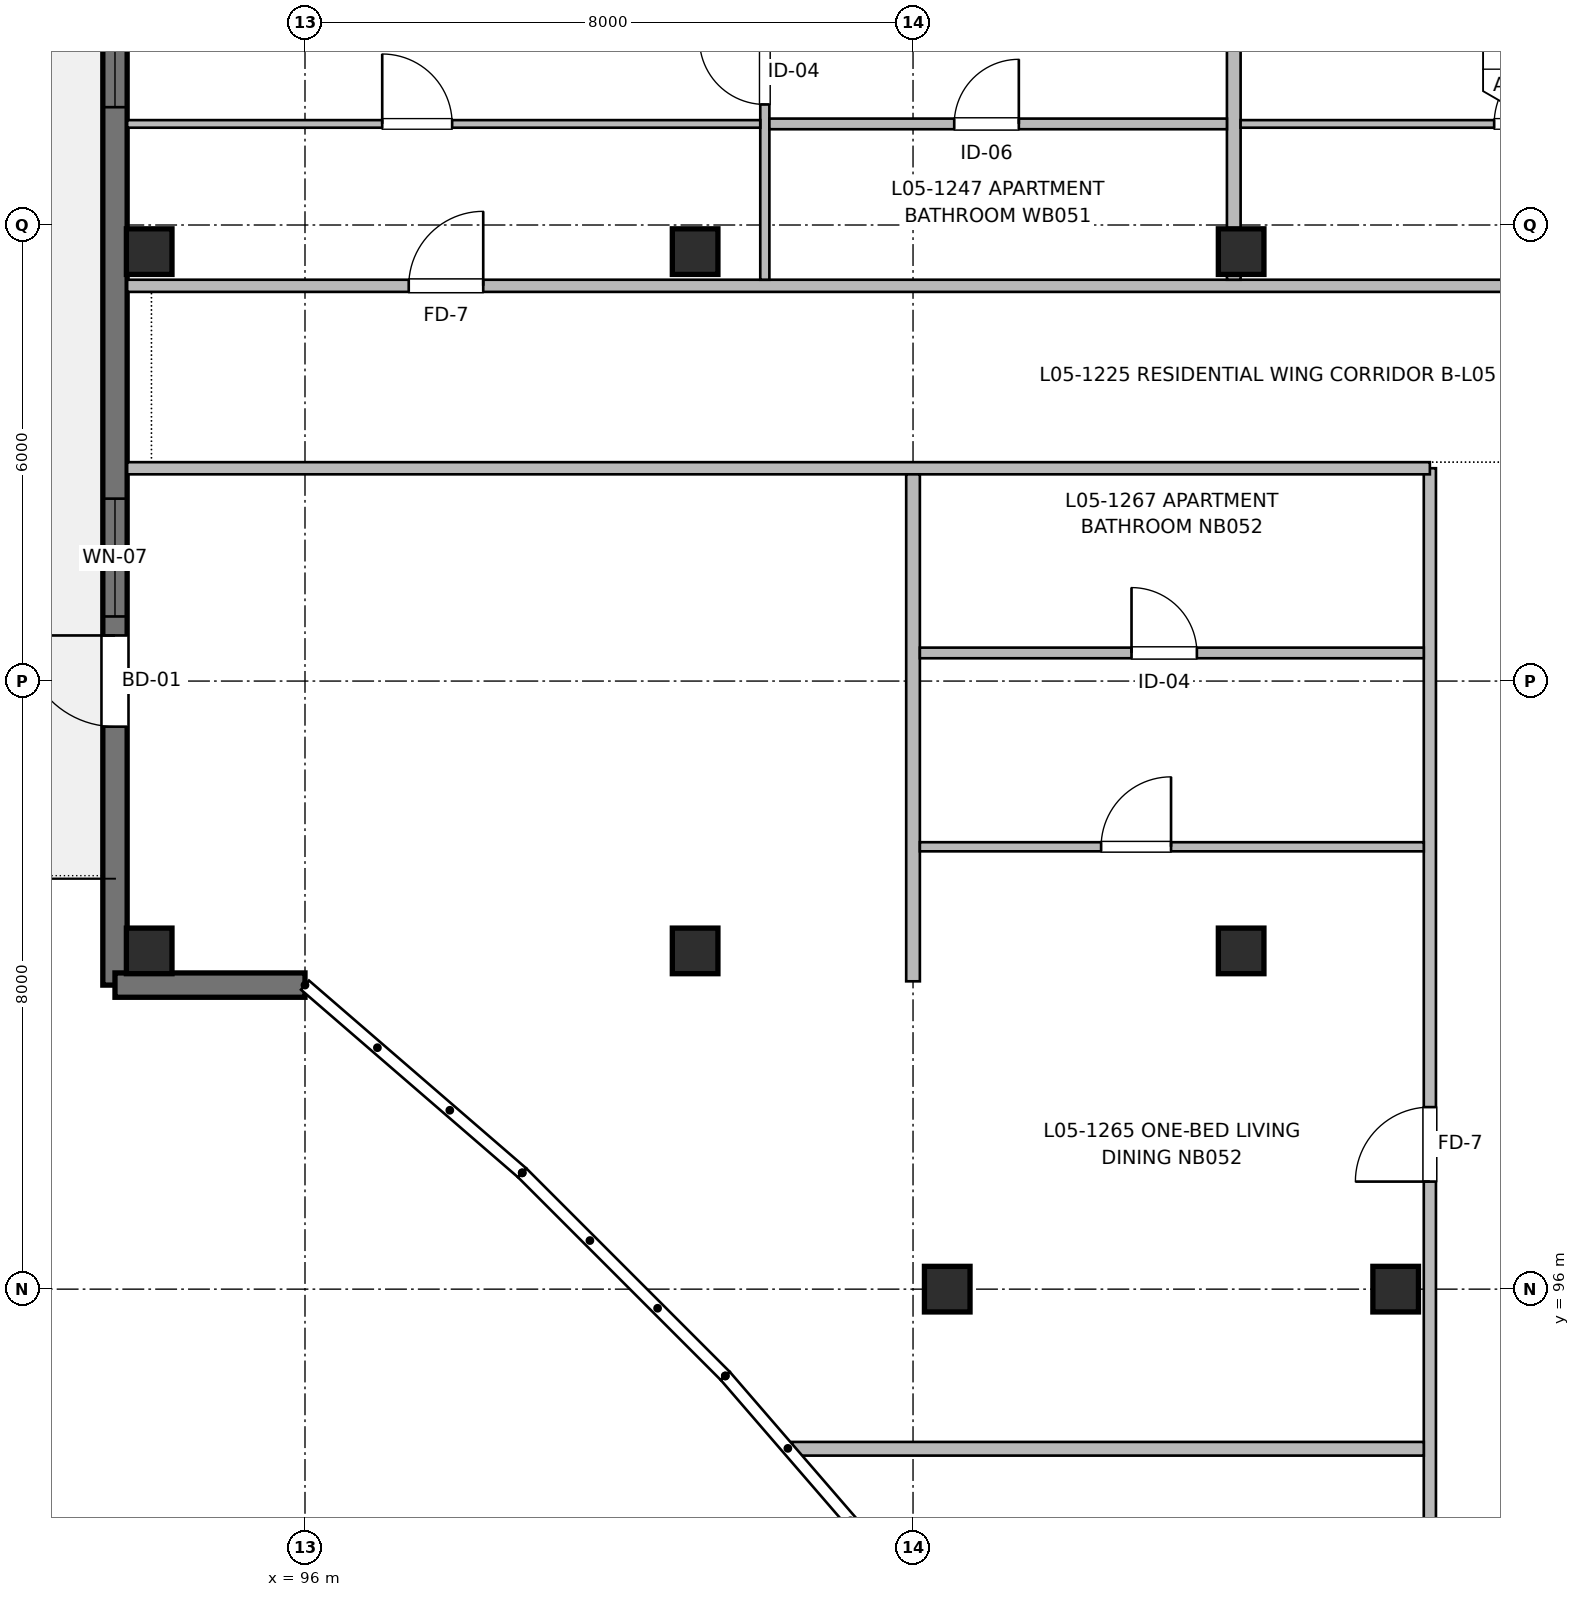
"""IFC4 building model, lengths in metres.
Left out: names, types, materials, properties, quantities, classifications, styles, units other than length and angle.
Written with IfcOpenShell. Run it as: python <this file> out.ifc"""

import sys

from ifc_helpers import new_model, si_unit, direction, frame, frame_2d, origin, origin_2d, place, context, subcontext, project, spatial, rectangle, extrude, element, fill, save


model = new_model("IFC4")
c1 = context("Model", 3, precision=1e-05, world=origin(), true_north=direction((0.0, 1.0)))
c2 = subcontext(c1, "Body", "Model", "MODEL_VIEW")
j1 = project(units=[si_unit("LENGTHUNIT", "METRE"), si_unit("PLANEANGLEUNIT", "RADIAN")], contexts=[c1])
p1 = place(None, origin())
s1 = spatial("IfcSite", under=j1, at=p1, CompositionType="ELEMENT")
p2 = place(p1, origin())
s2 = spatial("IfcBuilding", under=s1, at=p2, CompositionType="ELEMENT")
p3 = place(p2, frame((0.0, 0.0, 16.96)))
s3 = spatial("IfcBuildingStorey", under=s2, at=p3, CompositionType="ELEMENT", Elevation=16.96)
for number, where, z_axis, x_axis in (
    (1, (93.95, 100.45, 0.0), (0.0, 0.0, 1.0), (1.0, 0.0, 0.0)),
    (2, (93.95, 109.65, 0.0), (0.0, 0.0, 1.0), (1.0, 0.0, 0.0)),
    (3, (101.133, 100.45, 0.0), (0.0, 0.0, 1.0), (1.0, 0.0, 0.0)),
    (4, (101.133, 109.65, 0.0), (0.0, 0.0, 1.0), (1.0, 0.0, 0.0)),
    (5, (104.45, 96.0, 0.0), (0.0, 0.0, 1.0), (1.0, 0.0, 0.0)),
    (6, (108.317, 100.45, 0.0), (0.0, 0.0, 1.0), (1.0, 0.0, 0.0)),
    (7, (108.317, 109.65, 0.0), (0.0, 0.0, 1.0), (1.0, 0.0, 0.0)),
    (8, (110.35, 96.0, 0.0), (0.0, 0.0, 1.0), (1.0, 0.0, 0.0)),
):
    element("IfcColumn", number, at=place(p3, frame(where, z_axis=z_axis, x_axis=x_axis)), inside=s3, PredefinedType="COLUMN", context=c2, shape_type="SweptSolid", body=[
        extrude(rectangle(XDim=0.6, YDim=0.6, at=origin_2d()), origin(), (0.0, 0.0, 1.0), 3.2),
    ])
p4 = place(p3, frame((93.5, 100.0, 0.0), z_axis=(0.0, 0.0, 1.0), x_axis=(0.0, 1.0, 0.0)))
e9 = element("IfcWall", 9, at=p4, inside=s3, PredefinedType="SHEAR", context=c2, shape_type="SweptSolid", body=[
    extrude(rectangle(XDim=16.0, YDim=0.32, at=frame_2d((8.0, 0.0))), origin(), (0.0, 0.0, 1.0), 2.98),
])
p5 = place(p4, frame((3.4, 0.0, 0.0)))
e10 = element("IfcOpeningElement", 10, at=p5, cuts=e9, PredefinedType="OPENING", context=c2, shape_type="SweptSolid", body=[
    extrude(rectangle(XDim=1.2, YDim=2.2, at=frame_2d((0.6, 1.1))), frame((0.0, 0.17, 0.0), z_axis=(0.0, -1.0, 0.0), x_axis=(1.0, 0.0, 0.0)), (0.0, 0.0, 1.0), 0.34),
])
p6 = place(p4, frame((4.85, 0.0, 0.82)))
e11 = element("IfcOpeningElement", 11, at=p6, cuts=e9, PredefinedType="OPENING", context=c2, shape_type="SweptSolid", body=[
    extrude(rectangle(XDim=1.55, YDim=1.4, at=frame_2d((0.775, 0.7))), frame((0.0, 0.17, 0.0), z_axis=(0.0, -1.0, 0.0), x_axis=(1.0, 0.0, 0.0)), (0.0, 0.0, 1.0), 0.34),
])
p7 = place(p4, frame((11.55, 0.0, 0.67)))
e12 = element("IfcOpeningElement", 12, at=p7, cuts=e9, PredefinedType="OPENING", context=c2, shape_type="SweptSolid", body=[
    extrude(rectangle(XDim=2.6, YDim=1.55, at=frame_2d((1.3, 0.775))), frame((0.0, 0.17, 0.0), z_axis=(0.0, -1.0, 0.0), x_axis=(1.0, 0.0, 0.0)), (0.0, 0.0, 1.0), 0.34),
])
p8 = place(p3, frame((96.0, 100.0, 0.0), z_axis=(0.0, 0.0, 1.0), x_axis=(-1.0, 0.0, 0.0)))
e13 = element("IfcWall", 13, at=p8, inside=s3, PredefinedType="SHEAR", context=c2, shape_type="SweptSolid", body=[
    extrude(rectangle(XDim=2.5, YDim=0.32, at=frame_2d((1.25, 0.0))), origin(), (0.0, 0.0, 1.0), 2.98),
])
p9 = place(p3, frame((110.8, 56.16, 0.0), z_axis=(0.0, 0.0, 1.0), x_axis=(0.0, 1.0, 0.0)))
e14 = element("IfcWall", 14, at=p9, inside=s3, PredefinedType="PARTITIONING", context=c2, shape_type="SweptSolid", body=[
    extrude(rectangle(XDim=50.64, YDim=0.16, at=frame_2d((25.32, 0.0))), origin(), (0.0, 0.0, 1.0), 2.935),
])
p10 = place(p9, frame((12.84, 0.0, 0.0)))
e15 = element("IfcOpeningElement", 15, at=p10, cuts=e14, PredefinedType="OPENING", context=c2, shape_type="SweptSolid", body=[
    extrude(rectangle(XDim=1.1, YDim=2.15, at=frame_2d((0.55, 1.075))), frame((0.0, 0.09, 0.0), z_axis=(0.0, -1.0, 0.0), x_axis=(1.0, 0.0, 0.0)), (0.0, 0.0, 1.0), 0.18),
])
p11 = place(p9, frame((19.24, 0.0, 0.0)))
e16 = element("IfcOpeningElement", 16, at=p11, cuts=e14, PredefinedType="OPENING", context=c2, shape_type="SweptSolid", body=[
    extrude(rectangle(XDim=1.6, YDim=2.15, at=frame_2d((0.8, 1.075))), frame((0.0, 0.09, 0.0), z_axis=(0.0, -1.0, 0.0), x_axis=(1.0, 0.0, 0.0)), (0.0, 0.0, 1.0), 0.18),
])
p12 = place(p9, frame((1.8, 0.0, 0.0)))
e17 = element("IfcOpeningElement", 17, at=p12, cuts=e14, PredefinedType="OPENING", context=c2, shape_type="SweptSolid", body=[
    extrude(rectangle(XDim=0.96, YDim=2.15, at=frame_2d((0.48, 1.075))), frame((0.0, 0.09, 0.0), z_axis=(0.0, -1.0, 0.0), x_axis=(1.0, 0.0, 0.0)), (0.0, 0.0, 1.0), 0.18),
])
p13 = place(p9, frame((32.645, 0.0, 0.0)))
e18 = element("IfcOpeningElement", 18, at=p13, cuts=e14, PredefinedType="OPENING", context=c2, shape_type="SweptSolid", body=[
    extrude(rectangle(XDim=0.98, YDim=2.15, at=frame_2d((0.49, 1.075))), frame((0.0, 0.09, 0.0), z_axis=(0.0, -1.0, 0.0), x_axis=(1.0, 0.0, 0.0)), (0.0, 0.0, 1.0), 0.18),
])
p14 = place(p9, frame((41.255, 0.0, 0.0)))
e19 = element("IfcOpeningElement", 19, at=p14, cuts=e14, PredefinedType="OPENING", context=c2, shape_type="SweptSolid", body=[
    extrude(rectangle(XDim=0.98, YDim=2.15, at=frame_2d((0.49, 1.075))), frame((0.0, 0.09, 0.0), z_axis=(0.0, -1.0, 0.0), x_axis=(1.0, 0.0, 0.0)), (0.0, 0.0, 1.0), 0.18),
])
p15 = place(p3, frame((93.66, 106.8, 0.0), z_axis=(0.0, 0.0, 1.0), x_axis=(1.0, 0.0, 0.0)))
e20 = element("IfcWall", 20, at=p15, inside=s3, PredefinedType="PARTITIONING", context=c2, shape_type="SweptSolid", body=[
    extrude(rectangle(XDim=17.14, YDim=0.16, at=frame_2d((8.57, 0.0))), origin(), (0.0, 0.0, 1.0), 2.935),
])
p16 = place(p3, frame((93.66, 109.2, 0.0), z_axis=(0.0, 0.0, 1.0), x_axis=(1.0, 0.0, 0.0)))
e21 = element("IfcWall", 21, at=p16, inside=s3, PredefinedType="PARTITIONING", context=c2, shape_type="SweptSolid", body=[
    extrude(rectangle(XDim=43.68, YDim=0.16, at=frame_2d((21.84, 0.0))), origin(), (0.0, 0.0, 1.0), 2.935),
])
p17 = place(p16, frame((3.705, 0.0, 0.0)))
e22 = element("IfcOpeningElement", 22, at=p17, cuts=e21, PredefinedType="OPENING", context=c2, shape_type="SweptSolid", body=[
    extrude(rectangle(XDim=0.98, YDim=2.15, at=frame_2d((0.49, 1.075))), frame((0.0, 0.09, 0.0), z_axis=(0.0, -1.0, 0.0), x_axis=(1.0, 0.0, 0.0)), (0.0, 0.0, 1.0), 0.18),
])
p18 = place(p16, frame((18.33, 0.0, 0.0)))
e23 = element("IfcOpeningElement", 23, at=p18, cuts=e21, PredefinedType="OPENING", context=c2, shape_type="SweptSolid", body=[
    extrude(rectangle(XDim=0.98, YDim=2.15, at=frame_2d((0.49, 1.075))), frame((0.0, 0.09, 0.0), z_axis=(0.0, -1.0, 0.0), x_axis=(1.0, 0.0, 0.0)), (0.0, 0.0, 1.0), 0.18),
])
p19 = place(p16, frame((32.915, 0.0, 0.0)))
e24 = element("IfcOpeningElement", 24, at=p19, cuts=e21, PredefinedType="OPENING", context=c2, shape_type="SweptSolid", body=[
    extrude(rectangle(XDim=0.98, YDim=2.15, at=frame_2d((0.49, 1.075))), frame((0.0, 0.09, 0.0), z_axis=(0.0, -1.0, 0.0), x_axis=(1.0, 0.0, 0.0)), (0.0, 0.0, 1.0), 0.18),
])
p20 = place(p3, frame((104.0, 100.05, 0.0), z_axis=(0.0, 0.0, 1.0), x_axis=(0.0, 1.0, 0.0)))
e25 = element("IfcWall", 25, at=p20, inside=s3, PredefinedType="PARTITIONING", context=c2, shape_type="SweptSolid", body=[
    extrude(rectangle(XDim=6.67, YDim=0.18, at=frame_2d((3.335, 0.0))), origin(), (0.0, 0.0, 1.0), 2.935),
])
p21 = place(p3, frame((108.22, 109.28, 0.0), z_axis=(0.0, 0.0, 1.0), x_axis=(0.0, 1.0, 0.0)))
e26 = element("IfcWall", 26, at=p21, inside=s3, PredefinedType="PARTITIONING", context=c2, shape_type="SweptSolid", body=[
    extrude(rectangle(XDim=6.6, YDim=0.18, at=frame_2d((3.3, 0.0))), origin(), (0.0, 0.0, 1.0), 2.68),
])
p22 = place(p3, frame((102.05, 109.28, 0.0), z_axis=(0.0, 0.0, 1.0), x_axis=(0.0, 1.0, 0.0)))
e27 = element("IfcWall", 27, at=p22, inside=s3, PredefinedType="PARTITIONING", context=c2, shape_type="SweptSolid", body=[
    extrude(rectangle(XDim=6.6, YDim=0.12, at=frame_2d((3.3, 0.0))), origin(), (0.0, 0.0, 1.0), 2.935),
])
p23 = place(p22, frame((2.306, 0.0, 0.0)))
e28 = element("IfcOpeningElement", 28, at=p23, cuts=e27, PredefinedType="OPENING", context=c2, shape_type="SweptSolid", body=[
    extrude(rectangle(XDim=0.86, YDim=2.1, at=frame_2d((0.43, 1.05))), frame((0.0, 0.07, 0.0), z_axis=(0.0, -1.0, 0.0), x_axis=(1.0, 0.0, 0.0)), (0.0, 0.0, 1.0), 0.14),
])
p24 = place(p22, frame((4.097, 0.0, 0.0)))
e29 = element("IfcOpeningElement", 29, at=p24, cuts=e27, PredefinedType="OPENING", context=c2, shape_type="SweptSolid", body=[
    extrude(rectangle(XDim=0.9, YDim=2.1, at=frame_2d((0.45, 1.05))), frame((0.0, 0.07, 0.0), z_axis=(0.0, -1.0, 0.0), x_axis=(1.0, 0.0, 0.0)), (0.0, 0.0, 1.0), 0.14),
])
p25 = place(p3, frame((102.11, 111.33, 0.0), z_axis=(0.0, 0.0, 1.0), x_axis=(1.0, 0.0, 0.0)))
e30 = element("IfcWall", 30, at=p25, inside=s3, PredefinedType="PARTITIONING", context=c2, shape_type="SweptSolid", body=[
    extrude(rectangle(XDim=6.02, YDim=0.14, at=frame_2d((3.01, 0.0))), origin(), (0.0, 0.0, 1.0), 2.935),
])
p26 = place(p25, frame((2.432, 0.0, 0.0)))
e31 = element("IfcOpeningElement", 31, at=p26, cuts=e30, PredefinedType="OPENING", context=c2, shape_type="SweptSolid", body=[
    extrude(rectangle(XDim=0.85, YDim=2.05, at=frame_2d((0.425, 1.025))), frame((0.0, 0.08, 0.0), z_axis=(0.0, -1.0, 0.0), x_axis=(1.0, 0.0, 0.0)), (0.0, 0.0, 1.0), 0.16),
])
p27 = place(p3, frame((93.66, 111.33, 0.0), z_axis=(0.0, 0.0, 1.0), x_axis=(1.0, 0.0, 0.0)))
e32 = element("IfcWall", 32, at=p27, inside=s3, PredefinedType="PARTITIONING", context=c2, shape_type="SweptSolid", body=[
    extrude(rectangle(XDim=8.33, YDim=0.1, at=frame_2d((4.165, 0.0))), origin(), (0.0, 0.0, 1.0), 2.935),
])
p28 = place(p27, frame((3.356, 0.0, 0.0)))
e33 = element("IfcOpeningElement", 33, at=p28, cuts=e32, PredefinedType="OPENING", context=c2, shape_type="SweptSolid", body=[
    extrude(rectangle(XDim=0.92, YDim=2.1, at=frame_2d((0.46, 1.05))), frame((0.0, 0.06, 0.0), z_axis=(0.0, -1.0, 0.0), x_axis=(1.0, 0.0, 0.0)), (0.0, 0.0, 1.0), 0.12),
])
p29 = place(p3, frame((108.31, 111.33, 0.0), z_axis=(0.0, 0.0, 1.0), x_axis=(1.0, 0.0, 0.0)))
e34 = element("IfcWall", 34, at=p29, inside=s3, PredefinedType="PARTITIONING", context=c2, shape_type="SweptSolid", body=[
    extrude(rectangle(XDim=8.28, YDim=0.1, at=frame_2d((4.14, 0.0))), origin(), (0.0, 0.0, 1.0), 2.935),
])
p30 = place(p29, frame((3.336, 0.0, 0.0)))
e35 = element("IfcOpeningElement", 35, at=p30, cuts=e34, PredefinedType="OPENING", context=c2, shape_type="SweptSolid", body=[
    extrude(rectangle(XDim=0.92, YDim=2.1, at=frame_2d((0.46, 1.05))), frame((0.0, 0.06, 0.0), z_axis=(0.0, -1.0, 0.0), x_axis=(1.0, 0.0, 0.0)), (0.0, 0.0, 1.0), 0.12),
])
p31 = place(p3, frame((102.411, 93.9, 0.0), z_axis=(0.0, 0.0, 1.0), x_axis=(1.0, 0.0, 0.0)))
e36 = element("IfcWall", 36, at=p31, inside=s3, PredefinedType="PARTITIONING", context=c2, shape_type="SweptSolid", body=[
    extrude(rectangle(XDim=8.309, YDim=0.18, at=frame_2d((4.155, 0.0))), origin(), (0.0, 0.0, 1.0), 2.935),
])
p32 = place(p3, frame((104.09, 101.82, 0.0), z_axis=(0.0, 0.0, 1.0), x_axis=(1.0, 0.0, 0.0)))
e37 = element("IfcWall", 37, at=p32, inside=s3, PredefinedType="PARTITIONING", context=c2, shape_type="SweptSolid", body=[
    extrude(rectangle(XDim=6.63, YDim=0.12, at=frame_2d((3.315, 0.0))), origin(), (0.0, 0.0, 1.0), 2.935),
])
p33 = place(p32, frame((2.385, 0.0, 0.0)))
e38 = element("IfcOpeningElement", 38, at=p33, cuts=e37, PredefinedType="OPENING", context=c2, shape_type="SweptSolid", body=[
    extrude(rectangle(XDim=0.92, YDim=2.1, at=frame_2d((0.46, 1.05))), frame((0.0, 0.07, 0.0), z_axis=(0.0, -1.0, 0.0), x_axis=(1.0, 0.0, 0.0)), (0.0, 0.0, 1.0), 0.14),
])
p34 = place(p3, frame((104.09, 104.37, 0.0), z_axis=(0.0, 0.0, 1.0), x_axis=(1.0, 0.0, 0.0)))
e39 = element("IfcWall", 39, at=p34, inside=s3, PredefinedType="PARTITIONING", context=c2, shape_type="SweptSolid", body=[
    extrude(rectangle(XDim=6.63, YDim=0.14, at=frame_2d((3.315, 0.0))), origin(), (0.0, 0.0, 1.0), 2.935),
])
p35 = place(p34, frame((2.785, 0.0, 0.0)))
e40 = element("IfcOpeningElement", 40, at=p35, cuts=e39, PredefinedType="OPENING", context=c2, shape_type="SweptSolid", body=[
    extrude(rectangle(XDim=0.86, YDim=2.1, at=frame_2d((0.43, 1.05))), frame((0.0, 0.08, 0.0), z_axis=(0.0, -1.0, 0.0), x_axis=(1.0, 0.0, 0.0)), (0.0, 0.0, 1.0), 0.16),
])
p36 = place(p5, origin())
e41 = element("IfcDoor", 41, at=p36, inside=s3, OperationType="SINGLE_SWING_RIGHT", PredefinedType="DOOR", context=c2, shape_type="SweptSolid", body=[
    extrude(rectangle(XDim=1.2, YDim=2.2, at=frame_2d((0.6, 1.1))), frame((0.0, 0.025, 0.0), z_axis=(0.0, -1.0, 0.0), x_axis=(1.0, 0.0, 0.0)), (0.0, 0.0, 1.0), 0.05),
])
fill(e10, e41)
p37 = place(p6, origin())
e42 = element("IfcWindow", 42, at=p37, inside=s3, PartitioningType="SINGLE_PANEL", PredefinedType="WINDOW", context=c2, shape_type="SweptSolid", body=[
    extrude(rectangle(XDim=1.55, YDim=1.4, at=frame_2d((0.775, 0.7))), frame((0.0, 0.03, 0.0), z_axis=(0.0, -1.0, 0.0), x_axis=(1.0, 0.0, 0.0)), (0.0, 0.0, 1.0), 0.06),
])
fill(e11, e42)
p38 = place(p7, origin())
e43 = element("IfcWindow", 43, at=p38, inside=s3, PartitioningType="SINGLE_PANEL", PredefinedType="WINDOW", context=c2, shape_type="SweptSolid", body=[
    extrude(rectangle(XDim=2.6, YDim=1.55, at=frame_2d((1.3, 0.775))), frame((0.0, 0.03, 0.0), z_axis=(0.0, -1.0, 0.0), x_axis=(1.0, 0.0, 0.0)), (0.0, 0.0, 1.0), 0.06),
])
fill(e12, e43)
p39 = place(p17, origin())
e44 = element("IfcDoor", 44, at=p39, inside=s3, OperationType="SINGLE_SWING_RIGHT", PredefinedType="DOOR", context=c2, shape_type="SweptSolid", body=[
    extrude(rectangle(XDim=0.98, YDim=2.15, at=frame_2d((0.49, 1.075))), frame((0.0, 0.025, 0.0), z_axis=(0.0, -1.0, 0.0), x_axis=(1.0, 0.0, 0.0)), (0.0, 0.0, 1.0), 0.05),
])
fill(e22, e44)
p40 = place(p28, origin())
e45 = element("IfcDoor", 45, at=p40, inside=s3, OperationType="SINGLE_SWING_LEFT", PredefinedType="DOOR", context=c2, shape_type="SweptSolid", body=[
    extrude(rectangle(XDim=0.92, YDim=2.1, at=frame_2d((0.46, 1.05))), frame((0.0, 0.025, 0.0), z_axis=(0.0, -1.0, 0.0), x_axis=(1.0, 0.0, 0.0)), (0.0, 0.0, 1.0), 0.05),
])
fill(e33, e45)
p41 = place(p23, origin())
e46 = element("IfcDoor", 46, at=p41, inside=s3, OperationType="SINGLE_SWING_RIGHT", PredefinedType="DOOR", context=c2, shape_type="SweptSolid", body=[
    extrude(rectangle(XDim=0.86, YDim=2.1, at=frame_2d((0.43, 1.05))), frame((0.0, 0.025, 0.0), z_axis=(0.0, -1.0, 0.0), x_axis=(1.0, 0.0, 0.0)), (0.0, 0.0, 1.0), 0.05),
])
fill(e28, e46)
p42 = place(p26, origin())
e47 = element("IfcDoor", 47, at=p42, inside=s3, OperationType="SINGLE_SWING_RIGHT", PredefinedType="DOOR", context=c2, shape_type="SweptSolid", body=[
    extrude(rectangle(XDim=0.85, YDim=2.05, at=frame_2d((0.425, 1.025))), frame((0.0, 0.025, 0.0), z_axis=(0.0, -1.0, 0.0), x_axis=(1.0, 0.0, 0.0)), (0.0, 0.0, 1.0), 0.05),
])
fill(e31, e47)
p43 = place(p30, origin())
e48 = element("IfcDoor", 48, at=p43, inside=s3, OperationType="SINGLE_SWING_RIGHT", PredefinedType="DOOR", context=c2, shape_type="SweptSolid", body=[
    extrude(rectangle(XDim=0.92, YDim=2.1, at=frame_2d((0.46, 1.05))), frame((0.0, 0.025, 0.0), z_axis=(0.0, -1.0, 0.0), x_axis=(1.0, 0.0, 0.0)), (0.0, 0.0, 1.0), 0.05),
])
fill(e35, e48)
p44 = place(p35, origin())
e49 = element("IfcDoor", 49, at=p44, inside=s3, OperationType="SINGLE_SWING_LEFT", PredefinedType="DOOR", context=c2, shape_type="SweptSolid", body=[
    extrude(rectangle(XDim=0.86, YDim=2.1, at=frame_2d((0.43, 1.05))), frame((0.0, 0.025, 0.0), z_axis=(0.0, -1.0, 0.0), x_axis=(1.0, 0.0, 0.0)), (0.0, 0.0, 1.0), 0.05),
])
fill(e40, e49)
p45 = place(p33, origin())
e50 = element("IfcDoor", 50, at=p45, inside=s3, OperationType="SINGLE_SWING_RIGHT", PredefinedType="DOOR", context=c2, shape_type="SweptSolid", body=[
    extrude(rectangle(XDim=0.92, YDim=2.1, at=frame_2d((0.46, 1.05))), frame((0.0, 0.025, 0.0), z_axis=(0.0, -1.0, 0.0), x_axis=(1.0, 0.0, 0.0)), (0.0, 0.0, 1.0), 0.05),
])
fill(e38, e50)
p46 = place(p14, origin())
e51 = element("IfcDoor", 51, at=p46, inside=s3, OperationType="SINGLE_SWING_LEFT", PredefinedType="DOOR", context=c2, shape_type="SweptSolid", body=[
    extrude(rectangle(XDim=0.98, YDim=2.15, at=frame_2d((0.49, 1.075))), frame((0.0, 0.025, 0.0), z_axis=(0.0, -1.0, 0.0), x_axis=(1.0, 0.0, 0.0)), (0.0, 0.0, 1.0), 0.05),
])
fill(e19, e51)
save(model, sys.argv[1])
